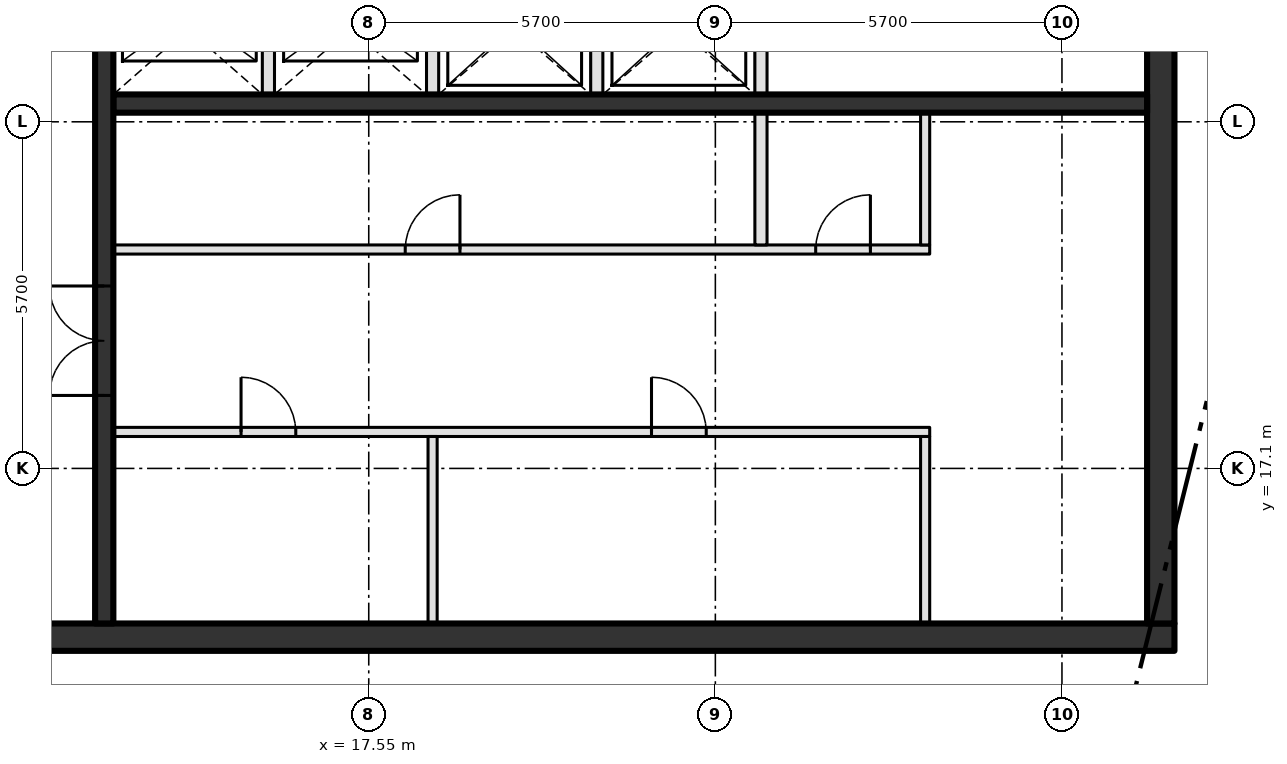
"""IFC4 building model, lengths in metres.
Left out: names, types, materials, properties, quantities, classifications, styles, units other than length and angle.
Written with IfcOpenShell. Run it as: python <this file> out.ifc"""

import sys

from ifc_helpers import new_model, si_unit, direction, frame, frame_2d, origin, place, context, subcontext, project, spatial, rectangle, extrude, element, fill, save


model = new_model("IFC4")
c1 = context("Model", 3, precision=1e-05, world=origin(), true_north=direction((0.0, 1.0)))
c2 = subcontext(c1, "Body", "Model", "MODEL_VIEW")
j1 = project(units=[si_unit("LENGTHUNIT", "METRE"), si_unit("PLANEANGLEUNIT", "RADIAN")], contexts=[c1])
p1 = place(None, origin())
s1 = spatial("IfcSite", under=j1, at=p1, CompositionType="ELEMENT")
p2 = place(p1, origin())
s2 = spatial("IfcBuilding", under=s1, at=p2, CompositionType="ELEMENT")
p3 = place(p2, frame((0.0, 0.0, 409.8)))
s3 = spatial("IfcBuildingStorey", under=s2, at=p3, CompositionType="ELEMENT", Elevation=409.8)
p4 = place(p3, frame((8.0, 14.325, -0.45), z_axis=(0.0, 0.0, 1.0), x_axis=(1.0, 0.0, 0.0)))
e1 = element("IfcWall", 1, at=p4, inside=s3, PredefinedType="SHEAR", context=c2, shape_type="SweptSolid", body=[
    extrude(rectangle(XDim=22.8, YDim=0.45, at=frame_2d((11.4, 0.0))), origin(), (0.0, 0.0, 1.0), 4.95),
])
p5 = place(p4, frame((2.3, 0.0, 0.45)))
e2 = element("IfcOpeningElement", 2, at=p5, cuts=e1, PredefinedType="OPENING", context=c2, shape_type="SweptSolid", body=[
    extrude(rectangle(XDim=1.8, YDim=2.1, at=frame_2d((0.9, 1.05))), frame((0.0, 0.235, 0.0), z_axis=(0.0, -1.0, 0.0), x_axis=(1.0, 0.0, 0.0)), (0.0, 0.0, 1.0), 0.47),
])
p6 = place(p3, frame((30.575, 14.55, -0.45), z_axis=(0.0, 0.0, 1.0), x_axis=(0.0, 1.0, 0.0)))
e3 = element("IfcWall", 3, at=p6, inside=s3, PredefinedType="SHEAR", context=c2, shape_type="SweptSolid", body=[
    extrude(rectangle(XDim=21.15, YDim=0.45, at=frame_2d((10.575, 0.0))), origin(), (0.0, 0.0, 1.0), 4.95),
])
p7 = place(p3, frame((13.35, 17.7, 0.0), z_axis=(0.0, 0.0, 1.0), x_axis=(1.0, 0.0, 0.0)))
e4 = element("IfcWall", 4, at=p7, inside=s3, PredefinedType="PARTITIONING", context=c2, shape_type="SweptSolid", body=[
    extrude(rectangle(XDim=13.425, YDim=0.15, at=frame_2d((6.712, 0.0))), origin(), (0.0, 0.0, 1.0), 4.5),
])
p8 = place(p7, frame((2.1, 0.0, 0.0)))
e5 = element("IfcOpeningElement", 5, at=p8, cuts=e4, PredefinedType="OPENING", context=c2, shape_type="SweptSolid", body=[
    extrude(rectangle(XDim=0.9, YDim=2.1, at=frame_2d((0.45, 1.05))), frame((0.0, 0.085, 0.0), z_axis=(0.0, -1.0, 0.0), x_axis=(1.0, 0.0, 0.0)), (0.0, 0.0, 1.0), 0.17),
])
p9 = place(p7, frame((8.85, 0.0, 0.0)))
e6 = element("IfcOpeningElement", 6, at=p9, cuts=e4, PredefinedType="OPENING", context=c2, shape_type="SweptSolid", body=[
    extrude(rectangle(XDim=0.9, YDim=2.1, at=frame_2d((0.45, 1.05))), frame((0.0, 0.085, 0.0), z_axis=(0.0, -1.0, 0.0), x_axis=(1.0, 0.0, 0.0)), (0.0, 0.0, 1.0), 0.17),
])
p10 = place(p3, frame((13.35, 20.7, 0.0), z_axis=(0.0, 0.0, 1.0), x_axis=(1.0, 0.0, 0.0)))
e7 = element("IfcWall", 7, at=p10, inside=s3, PredefinedType="PARTITIONING", context=c2, shape_type="SweptSolid", body=[
    extrude(rectangle(XDim=13.425, YDim=0.15, at=frame_2d((6.712, 0.0))), origin(), (0.0, 0.0, 1.0), 4.5),
])
p11 = place(p10, frame((4.8, 0.0, 0.0)))
e8 = element("IfcOpeningElement", 8, at=p11, cuts=e7, PredefinedType="OPENING", context=c2, shape_type="SweptSolid", body=[
    extrude(rectangle(XDim=0.9, YDim=2.1, at=frame_2d((0.45, 1.05))), frame((0.0, 0.085, 0.0), z_axis=(0.0, -1.0, 0.0), x_axis=(1.0, 0.0, 0.0)), (0.0, 0.0, 1.0), 0.17),
])
p12 = place(p10, frame((11.55, 0.0, 0.0)))
e9 = element("IfcOpeningElement", 9, at=p12, cuts=e7, PredefinedType="OPENING", context=c2, shape_type="SweptSolid", body=[
    extrude(rectangle(XDim=0.9, YDim=2.1, at=frame_2d((0.45, 1.05))), frame((0.0, 0.085, 0.0), z_axis=(0.0, -1.0, 0.0), x_axis=(1.0, 0.0, 0.0)), (0.0, 0.0, 1.0), 0.17),
])
p13 = place(p3, frame((13.35, 23.1, 0.0), z_axis=(0.0, 0.0, 1.0), x_axis=(1.0, 0.0, 0.0)))
e10 = element("IfcWall", 10, at=p13, inside=s3, PredefinedType="SHEAR", context=c2, shape_type="SweptSolid", body=[
    extrude(rectangle(XDim=17.0, YDim=0.3, at=frame_2d((8.5, 0.0))), origin(), (0.0, 0.0, 1.0), 4.5),
])
p14 = place(p3, frame((13.2, 14.55, 0.0), z_axis=(0.0, 0.0, 1.0), x_axis=(0.0, 1.0, 0.0)))
e11 = element("IfcWall", 11, at=p14, inside=s3, PredefinedType="SHEAR", context=c2, shape_type="SweptSolid", body=[
    extrude(rectangle(XDim=21.15, YDim=0.3, at=frame_2d((10.575, 0.0))), origin(), (0.0, 0.0, 1.0), 4.5),
])
p15 = place(p14, frame((3.75, 0.0, 0.0)))
e12 = element("IfcOpeningElement", 12, at=p15, cuts=e11, PredefinedType="OPENING", context=c2, shape_type="SweptSolid", body=[
    extrude(rectangle(XDim=1.8, YDim=2.1, at=frame_2d((0.9, 1.05))), frame((0.0, 0.16, 0.0), z_axis=(0.0, -1.0, 0.0), x_axis=(1.0, 0.0, 0.0)), (0.0, 0.0, 1.0), 0.32),
])
p16 = place(p14, frame((11.85, 0.0, 0.0)))
e13 = element("IfcOpeningElement", 13, at=p16, cuts=e11, PredefinedType="OPENING", context=c2, shape_type="SweptSolid", body=[
    extrude(rectangle(XDim=1.2, YDim=2.1, at=frame_2d((0.6, 1.05))), frame((0.0, 0.16, 0.0), z_axis=(0.0, -1.0, 0.0), x_axis=(1.0, 0.0, 0.0)), (0.0, 0.0, 1.0), 0.32),
])
p17 = place(p3, frame((15.9, 23.25, 0.0), z_axis=(0.0, 0.0, 1.0), x_axis=(0.0, 1.0, 0.0)))
e14 = element("IfcWall", 14, at=p17, inside=s3, PredefinedType="SOLIDWALL", context=c2, shape_type="SweptSolid", body=[
    extrude(rectangle(XDim=2.15, YDim=0.2, at=frame_2d((1.075, 0.0))), origin(), (0.0, 0.0, 1.0), 4.5),
])
p18 = place(p3, frame((18.6, 14.55, 0.0), z_axis=(0.0, 0.0, 1.0), x_axis=(0.0, 1.0, 0.0)))
e15 = element("IfcWall", 15, at=p18, inside=s3, PredefinedType="PARTITIONING", context=c2, shape_type="SweptSolid", body=[
    extrude(rectangle(XDim=3.075, YDim=0.15, at=frame_2d((1.538, 0.0))), origin(), (0.0, 0.0, 1.0), 4.5),
])
p19 = place(p3, frame((18.6, 23.25, 0.0), z_axis=(0.0, 0.0, 1.0), x_axis=(0.0, 1.0, 0.0)))
e16 = element("IfcWall", 16, at=p19, inside=s3, PredefinedType="SOLIDWALL", context=c2, shape_type="SweptSolid", body=[
    extrude(rectangle(XDim=5.15, YDim=0.2, at=frame_2d((2.575, 0.0))), origin(), (0.0, 0.0, 1.0), 4.5),
])
p20 = place(p19, frame((3.15, 0.0, 0.0)))
e17 = element("IfcOpeningElement", 17, at=p20, cuts=e16, PredefinedType="OPENING", context=c2, shape_type="SweptSolid", body=[
    extrude(rectangle(XDim=1.2, YDim=2.1, at=frame_2d((0.6, 1.05))), frame((0.0, 0.11, 0.0), z_axis=(0.0, -1.0, 0.0), x_axis=(1.0, 0.0, 0.0)), (0.0, 0.0, 1.0), 0.22),
])
p21 = place(p3, frame((21.3, 23.25, 0.0), z_axis=(0.0, 0.0, 1.0), x_axis=(0.0, 1.0, 0.0)))
e18 = element("IfcWall", 18, at=p21, inside=s3, PredefinedType="SOLIDWALL", context=c2, shape_type="SweptSolid", body=[
    extrude(rectangle(XDim=2.15, YDim=0.2, at=frame_2d((1.075, 0.0))), origin(), (0.0, 0.0, 1.0), 4.5),
])
p22 = place(p3, frame((24.0, 20.775, 0.0), z_axis=(0.0, 0.0, 1.0), x_axis=(0.0, 1.0, 0.0)))
e19 = element("IfcWall", 19, at=p22, inside=s3, PredefinedType="SOLIDWALL", context=c2, shape_type="SweptSolid", body=[
    extrude(rectangle(XDim=4.625, YDim=0.2, at=frame_2d((2.312, 0.0))), origin(), (0.0, 0.0, 1.0), 4.5),
])
p23 = place(p3, frame((26.7, 14.55, 0.0), z_axis=(0.0, 0.0, 1.0), x_axis=(0.0, 1.0, 0.0)))
e20 = element("IfcWall", 20, at=p23, inside=s3, PredefinedType="PARTITIONING", context=c2, shape_type="SweptSolid", body=[
    extrude(rectangle(XDim=3.075, YDim=0.15, at=frame_2d((1.538, 0.0))), origin(), (0.0, 0.0, 1.0), 4.5),
])
p24 = place(p3, frame((26.7, 20.775, 0.0), z_axis=(0.0, 0.0, 1.0), x_axis=(0.0, 1.0, 0.0)))
e21 = element("IfcWall", 21, at=p24, inside=s3, PredefinedType="PARTITIONING", context=c2, shape_type="SweptSolid", body=[
    extrude(rectangle(XDim=2.175, YDim=0.15, at=frame_2d((1.087, 0.0))), origin(), (0.0, 0.0, 1.0), 4.5),
])
p25 = place(p8, origin())
e22 = element("IfcDoor", 22, at=p25, inside=s3, OperationType="SINGLE_SWING_LEFT", PredefinedType="DOOR", context=c2, shape_type="SweptSolid", body=[
    extrude(rectangle(XDim=0.9, YDim=2.1, at=frame_2d((0.45, 1.05))), frame((0.0, 0.025, 0.0), z_axis=(0.0, -1.0, 0.0), x_axis=(1.0, 0.0, 0.0)), (0.0, 0.0, 1.0), 0.05),
])
fill(e5, e22)
p26 = place(p9, origin())
e23 = element("IfcDoor", 23, at=p26, inside=s3, OperationType="SINGLE_SWING_LEFT", PredefinedType="DOOR", context=c2, shape_type="SweptSolid", body=[
    extrude(rectangle(XDim=0.9, YDim=2.1, at=frame_2d((0.45, 1.05))), frame((0.0, 0.025, 0.0), z_axis=(0.0, -1.0, 0.0), x_axis=(1.0, 0.0, 0.0)), (0.0, 0.0, 1.0), 0.05),
])
fill(e6, e23)
p27 = place(p11, origin())
e24 = element("IfcDoor", 24, at=p27, inside=s3, OperationType="SINGLE_SWING_RIGHT", PredefinedType="DOOR", context=c2, shape_type="SweptSolid", body=[
    extrude(rectangle(XDim=0.9, YDim=2.1, at=frame_2d((0.45, 1.05))), frame((0.0, 0.025, 0.0), z_axis=(0.0, -1.0, 0.0), x_axis=(1.0, 0.0, 0.0)), (0.0, 0.0, 1.0), 0.05),
])
fill(e8, e24)
p28 = place(p12, origin())
e25 = element("IfcDoor", 25, at=p28, inside=s3, OperationType="SINGLE_SWING_RIGHT", PredefinedType="DOOR", context=c2, shape_type="SweptSolid", body=[
    extrude(rectangle(XDim=0.9, YDim=2.1, at=frame_2d((0.45, 1.05))), frame((0.0, 0.025, 0.0), z_axis=(0.0, -1.0, 0.0), x_axis=(1.0, 0.0, 0.0)), (0.0, 0.0, 1.0), 0.05),
])
fill(e9, e25)
p29 = place(p15, origin())
e26 = element("IfcDoor", 26, at=p29, inside=s3, OperationType="DOUBLE_DOOR_SINGLE_SWING", PredefinedType="DOOR", context=c2, shape_type="SweptSolid", body=[
    extrude(rectangle(XDim=1.8, YDim=2.1, at=frame_2d((0.9, 1.05))), frame((0.0, 0.025, 0.0), z_axis=(0.0, -1.0, 0.0), x_axis=(1.0, 0.0, 0.0)), (0.0, 0.0, 1.0), 0.05),
])
fill(e12, e26)
save(model, sys.argv[1])
